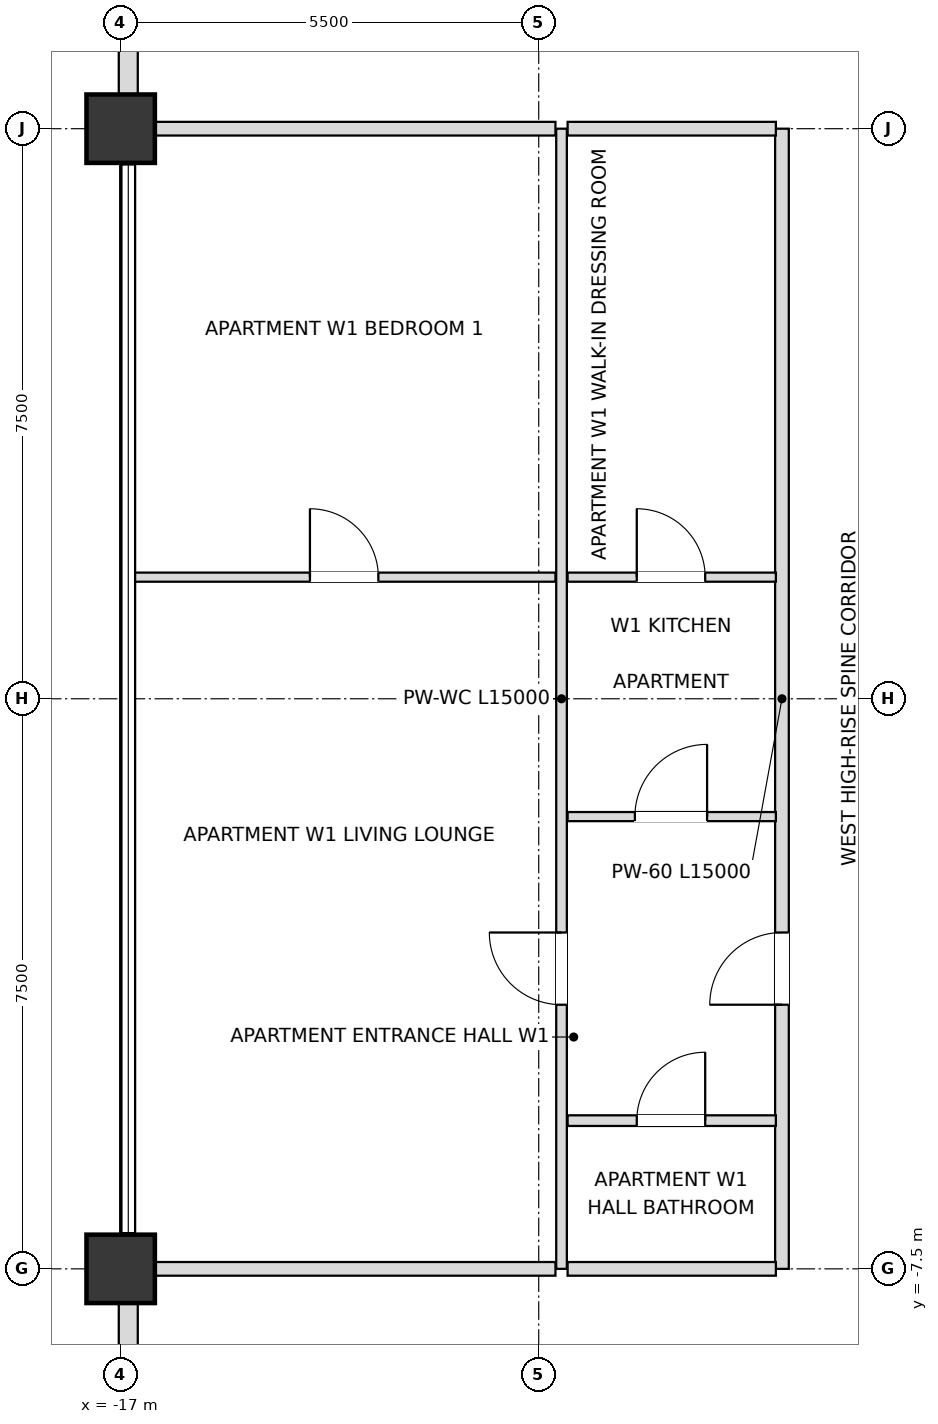
"""IFC4 building model, lengths in metres.
Left out: names, types, materials, properties, quantities, classifications, styles, units other than length and angle.
Written with IfcOpenShell. Run it as: python <this file> out.ifc"""

import sys

from ifc_helpers import new_model, si_unit, direction, frame, frame_2d, origin, origin_2d, place, context, subcontext, project, spatial, rectangle, extrude, element, fill, save


model = new_model("IFC4")
c1 = context("Model", 3, precision=1e-05, world=origin(), true_north=direction((0.0, 1.0)))
c2 = subcontext(c1, "Body", "Model", "MODEL_VIEW")
j1 = project(units=[si_unit("LENGTHUNIT", "METRE"), si_unit("PLANEANGLEUNIT", "RADIAN")], contexts=[c1])
p1 = place(None, origin())
s1 = spatial("IfcSite", under=j1, at=p1, CompositionType="ELEMENT")
p2 = place(p1, origin())
s2 = spatial("IfcBuilding", under=s1, at=p2, CompositionType="ELEMENT")
p3 = place(p2, frame((0.0, 0.0, 243.9)))
s3 = spatial("IfcBuildingStorey", under=s2, at=p3, CompositionType="ELEMENT", Elevation=243.9)
for number, where, z_axis, x_axis in (
    (1, (-17.0, 7.5, 0.0), (0.0, 0.0, 1.0), (1.0, 0.0, 0.0)),
    (2, (-17.0, -7.5, 0.0), (0.0, 0.0, 1.0), (1.0, 0.0, 0.0)),
):
    element("IfcColumn", number, at=place(p3, frame(where, z_axis=z_axis, x_axis=x_axis)), inside=s3, PredefinedType="USERDEFINED", context=c2, shape_type="SweptSolid", body=[
        extrude(rectangle(XDim=0.9, YDim=0.9, at=origin_2d()), origin(), (0.0, 0.0, 1.0), 3.6),
    ])
p4 = place(p3, frame((-16.9, 12.555, 0.0), z_axis=(0.0, 0.0, 1.0), x_axis=(0.0, -1.0, 0.0)))
e3 = element("IfcWall", 3, at=p4, inside=s3, PredefinedType="SOLIDWALL", context=c2, shape_type="SweptSolid", body=[
    extrude(rectangle(XDim=4.61, YDim=0.25, at=frame_2d((2.305, 0.0))), origin(), (0.0, 0.0, 1.0), 2.748),
])
p5 = place(p4, frame((1.405, 0.0, 0.72)))
e4 = element("IfcOpeningElement", 4, at=p5, cuts=e3, PredefinedType="OPENING", context=c2, shape_type="SweptSolid", body=[
    extrude(rectangle(XDim=1.8, YDim=1.68, at=frame_2d((0.9, 0.84))), frame((0.0, 0.135, 0.0), z_axis=(0.0, -1.0, 0.0), x_axis=(1.0, 0.0, 0.0)), (0.0, 0.0, 1.0), 0.27),
])
p6 = place(p3, frame((-16.9, -7.945, 0.0), z_axis=(0.0, 0.0, 1.0), x_axis=(0.0, -1.0, 0.0)))
e5 = element("IfcWall", 5, at=p6, inside=s3, PredefinedType="SOLIDWALL", context=c2, shape_type="SweptSolid", body=[
    extrude(rectangle(XDim=4.61, YDim=0.25, at=frame_2d((2.305, 0.0))), origin(), (0.0, 0.0, 1.0), 2.748),
])
p7 = place(p6, frame((1.405, 0.0, 0.72)))
e6 = element("IfcOpeningElement", 6, at=p7, cuts=e5, PredefinedType="OPENING", context=c2, shape_type="SweptSolid", body=[
    extrude(rectangle(XDim=1.8, YDim=1.68, at=frame_2d((0.9, 0.84))), frame((0.0, 0.135, 0.0), z_axis=(0.0, -1.0, 0.0), x_axis=(1.0, 0.0, 0.0)), (0.0, 0.0, 1.0), 0.27),
])
p8 = place(p3, frame((-11.2, -7.5, 0.0), z_axis=(0.0, 0.0, 1.0), x_axis=(0.0, 1.0, 0.0)))
e7 = element("IfcWall", 7, at=p8, inside=s3, PredefinedType="PARTITIONING", context=c2, shape_type="SweptSolid", body=[
    extrude(rectangle(XDim=15.0, YDim=0.14, at=frame_2d((7.5, 0.0))), origin(), (0.0, 0.0, 1.0), 3.38),
])
p9 = place(p8, frame((3.475, 0.0, 0.0)))
e8 = element("IfcOpeningElement", 8, at=p9, cuts=e7, PredefinedType="OPENING", context=c2, shape_type="SweptSolid", body=[
    extrude(rectangle(XDim=0.95, YDim=2.1, at=frame_2d((0.475, 1.05))), frame((0.0, 0.08, 0.0), z_axis=(0.0, -1.0, 0.0), x_axis=(1.0, 0.0, 0.0)), (0.0, 0.0, 1.0), 0.16),
])
p10 = place(p3, frame((-8.3, -7.5, 0.0), z_axis=(0.0, 0.0, 1.0), x_axis=(0.0, 1.0, 0.0)))
e9 = element("IfcWall", 9, at=p10, inside=s3, PredefinedType="PARTITIONING", context=c2, shape_type="SweptSolid", body=[
    extrude(rectangle(XDim=15.0, YDim=0.18, at=frame_2d((7.5, 0.0))), origin(), (0.0, 0.0, 1.0), 3.38),
])
p11 = place(p10, frame((3.475, 0.0, 0.0)))
e10 = element("IfcOpeningElement", 10, at=p11, cuts=e9, PredefinedType="OPENING", context=c2, shape_type="SweptSolid", body=[
    extrude(rectangle(XDim=0.95, YDim=2.15, at=frame_2d((0.475, 1.075))), frame((0.0, 0.1, 0.0), z_axis=(0.0, -1.0, 0.0), x_axis=(1.0, 0.0, 0.0)), (0.0, 0.0, 1.0), 0.2),
])
p12 = place(p3, frame((-16.9, -7.5, 0.0), z_axis=(0.0, 0.0, 1.0), x_axis=(1.0, 0.0, 0.0)))
e11 = element("IfcWall", 11, at=p12, inside=s3, PredefinedType="PARTITIONING", context=c2, shape_type="SweptSolid", body=[
    extrude(rectangle(XDim=5.62, YDim=0.18, at=frame_2d((2.81, 0.0))), origin(), (0.0, 0.0, 1.0), 2.826),
])
p13 = place(p3, frame((-11.12, -7.5, 0.0), z_axis=(0.0, 0.0, 1.0), x_axis=(1.0, 0.0, 0.0)))
e12 = element("IfcWall", 12, at=p13, inside=s3, PredefinedType="PARTITIONING", context=c2, shape_type="SweptSolid", body=[
    extrude(rectangle(XDim=2.74, YDim=0.18, at=frame_2d((1.37, 0.0))), origin(), (0.0, 0.0, 1.0), 2.826),
])
p14 = place(p3, frame((-11.12, -5.55, 0.0), z_axis=(0.0, 0.0, 1.0), x_axis=(1.0, 0.0, 0.0)))
e13 = element("IfcWall", 13, at=p14, inside=s3, PredefinedType="PARTITIONING", context=c2, shape_type="SweptSolid", body=[
    extrude(rectangle(XDim=2.74, YDim=0.14, at=frame_2d((1.37, 0.0))), origin(), (0.0, 0.0, 1.0), 3.38),
])
p15 = place(p14, frame((0.91, 0.0, 0.0)))
e14 = element("IfcOpeningElement", 14, at=p15, cuts=e13, PredefinedType="OPENING", context=c2, shape_type="SweptSolid", body=[
    extrude(rectangle(XDim=0.9, YDim=2.1, at=frame_2d((0.45, 1.05))), frame((0.0, 0.08, 0.0), z_axis=(0.0, -1.0, 0.0), x_axis=(1.0, 0.0, 0.0)), (0.0, 0.0, 1.0), 0.16),
])
p16 = place(p3, frame((-11.12, -1.55, 0.0), z_axis=(0.0, 0.0, 1.0), x_axis=(1.0, 0.0, 0.0)))
e15 = element("IfcWall", 15, at=p16, inside=s3, PredefinedType="PARTITIONING", context=c2, shape_type="SweptSolid", body=[
    extrude(rectangle(XDim=2.74, YDim=0.12, at=frame_2d((1.37, 0.0))), origin(), (0.0, 0.0, 1.0), 3.38),
])
p17 = place(p16, frame((0.885, 0.0, 0.0)))
e16 = element("IfcOpeningElement", 16, at=p17, cuts=e15, PredefinedType="OPENING", context=c2, shape_type="SweptSolid", body=[
    extrude(rectangle(XDim=0.95, YDim=2.1, at=frame_2d((0.475, 1.05))), frame((0.0, 0.07, 0.0), z_axis=(0.0, -1.0, 0.0), x_axis=(1.0, 0.0, 0.0)), (0.0, 0.0, 1.0), 0.14),
])
p18 = place(p3, frame((-16.82, 1.6, 0.0), z_axis=(0.0, 0.0, 1.0), x_axis=(1.0, 0.0, 0.0)))
e17 = element("IfcWall", 17, at=p18, inside=s3, PredefinedType="PARTITIONING", context=c2, shape_type="SweptSolid", body=[
    extrude(rectangle(XDim=5.54, YDim=0.12, at=frame_2d((2.77, 0.0))), origin(), (0.0, 0.0, 1.0), 3.018),
])
p19 = place(p18, frame((2.31, 0.0, 0.0)))
e18 = element("IfcOpeningElement", 18, at=p19, cuts=e17, PredefinedType="OPENING", context=c2, shape_type="SweptSolid", body=[
    extrude(rectangle(XDim=0.9, YDim=2.1, at=frame_2d((0.45, 1.05))), frame((0.0, 0.07, 0.0), z_axis=(0.0, -1.0, 0.0), x_axis=(1.0, 0.0, 0.0)), (0.0, 0.0, 1.0), 0.14),
])
p20 = place(p3, frame((-11.12, 1.6, 0.0), z_axis=(0.0, 0.0, 1.0), x_axis=(1.0, 0.0, 0.0)))
e19 = element("IfcWall", 19, at=p20, inside=s3, PredefinedType="PARTITIONING", context=c2, shape_type="SweptSolid", body=[
    extrude(rectangle(XDim=2.74, YDim=0.12, at=frame_2d((1.37, 0.0))), origin(), (0.0, 0.0, 1.0), 3.38),
])
p21 = place(p20, frame((0.91, 0.0, 0.0)))
e20 = element("IfcOpeningElement", 20, at=p21, cuts=e19, PredefinedType="OPENING", context=c2, shape_type="SweptSolid", body=[
    extrude(rectangle(XDim=0.9, YDim=2.1, at=frame_2d((0.45, 1.05))), frame((0.0, 0.07, 0.0), z_axis=(0.0, -1.0, 0.0), x_axis=(1.0, 0.0, 0.0)), (0.0, 0.0, 1.0), 0.14),
])
p22 = place(p3, frame((-16.9, 7.5, 0.0), z_axis=(0.0, 0.0, 1.0), x_axis=(1.0, 0.0, 0.0)))
e21 = element("IfcWall", 21, at=p22, inside=s3, PredefinedType="PARTITIONING", context=c2, shape_type="SweptSolid", body=[
    extrude(rectangle(XDim=5.62, YDim=0.18, at=frame_2d((2.81, 0.0))), origin(), (0.0, 0.0, 1.0), 2.826),
])
p23 = place(p3, frame((-11.12, 7.5, 0.0), z_axis=(0.0, 0.0, 1.0), x_axis=(1.0, 0.0, 0.0)))
e22 = element("IfcWall", 22, at=p23, inside=s3, PredefinedType="PARTITIONING", context=c2, shape_type="SweptSolid", body=[
    extrude(rectangle(XDim=2.74, YDim=0.18, at=frame_2d((1.37, 0.0))), origin(), (0.0, 0.0, 1.0), 2.826),
])
p24 = place(p15, origin())
e23 = element("IfcDoor", 23, at=p24, inside=s3, OperationType="SINGLE_SWING_RIGHT", PredefinedType="DOOR", context=c2, shape_type="SweptSolid", body=[
    extrude(rectangle(XDim=0.9, YDim=2.1, at=frame_2d((0.45, 1.05))), frame((0.0, 0.025, 0.0), z_axis=(0.0, -1.0, 0.0), x_axis=(1.0, 0.0, 0.0)), (0.0, 0.0, 1.0), 0.05),
])
fill(e14, e23)
p25 = place(p11, origin())
e24 = element("IfcDoor", 24, at=p25, inside=s3, OperationType="SINGLE_SWING_LEFT", PredefinedType="DOOR", context=c2, shape_type="SweptSolid", body=[
    extrude(rectangle(XDim=0.95, YDim=2.15, at=frame_2d((0.475, 1.075))), frame((0.0, 0.025, 0.0), z_axis=(0.0, -1.0, 0.0), x_axis=(1.0, 0.0, 0.0)), (0.0, 0.0, 1.0), 0.05),
])
fill(e10, e24)
p26 = place(p17, origin())
e25 = element("IfcDoor", 25, at=p26, inside=s3, OperationType="SINGLE_SWING_RIGHT", PredefinedType="DOOR", context=c2, shape_type="SweptSolid", body=[
    extrude(rectangle(XDim=0.95, YDim=2.1, at=frame_2d((0.475, 1.05))), frame((0.0, 0.025, 0.0), z_axis=(0.0, -1.0, 0.0), x_axis=(1.0, 0.0, 0.0)), (0.0, 0.0, 1.0), 0.05),
])
fill(e16, e25)
p27 = place(p21, origin())
e26 = element("IfcDoor", 26, at=p27, inside=s3, OperationType="SINGLE_SWING_LEFT", PredefinedType="DOOR", context=c2, shape_type="SweptSolid", body=[
    extrude(rectangle(XDim=0.9, YDim=2.1, at=frame_2d((0.45, 1.05))), frame((0.0, 0.025, 0.0), z_axis=(0.0, -1.0, 0.0), x_axis=(1.0, 0.0, 0.0)), (0.0, 0.0, 1.0), 0.05),
])
fill(e20, e26)
p28 = place(p9, origin())
e27 = element("IfcDoor", 27, at=p28, inside=s3, OperationType="SINGLE_SWING_RIGHT", PredefinedType="DOOR", context=c2, shape_type="SweptSolid", body=[
    extrude(rectangle(XDim=0.95, YDim=2.1, at=frame_2d((0.475, 1.05))), frame((0.0, 0.025, 0.0), z_axis=(0.0, -1.0, 0.0), x_axis=(1.0, 0.0, 0.0)), (0.0, 0.0, 1.0), 0.05),
])
fill(e8, e27)
p29 = place(p19, origin())
e28 = element("IfcDoor", 28, at=p29, inside=s3, OperationType="SINGLE_SWING_LEFT", PredefinedType="DOOR", context=c2, shape_type="SweptSolid", body=[
    extrude(rectangle(XDim=0.9, YDim=2.1, at=frame_2d((0.45, 1.05))), frame((0.0, 0.025, 0.0), z_axis=(0.0, -1.0, 0.0), x_axis=(1.0, 0.0, 0.0)), (0.0, 0.0, 1.0), 0.05),
])
fill(e18, e28)
save(model, sys.argv[1])
